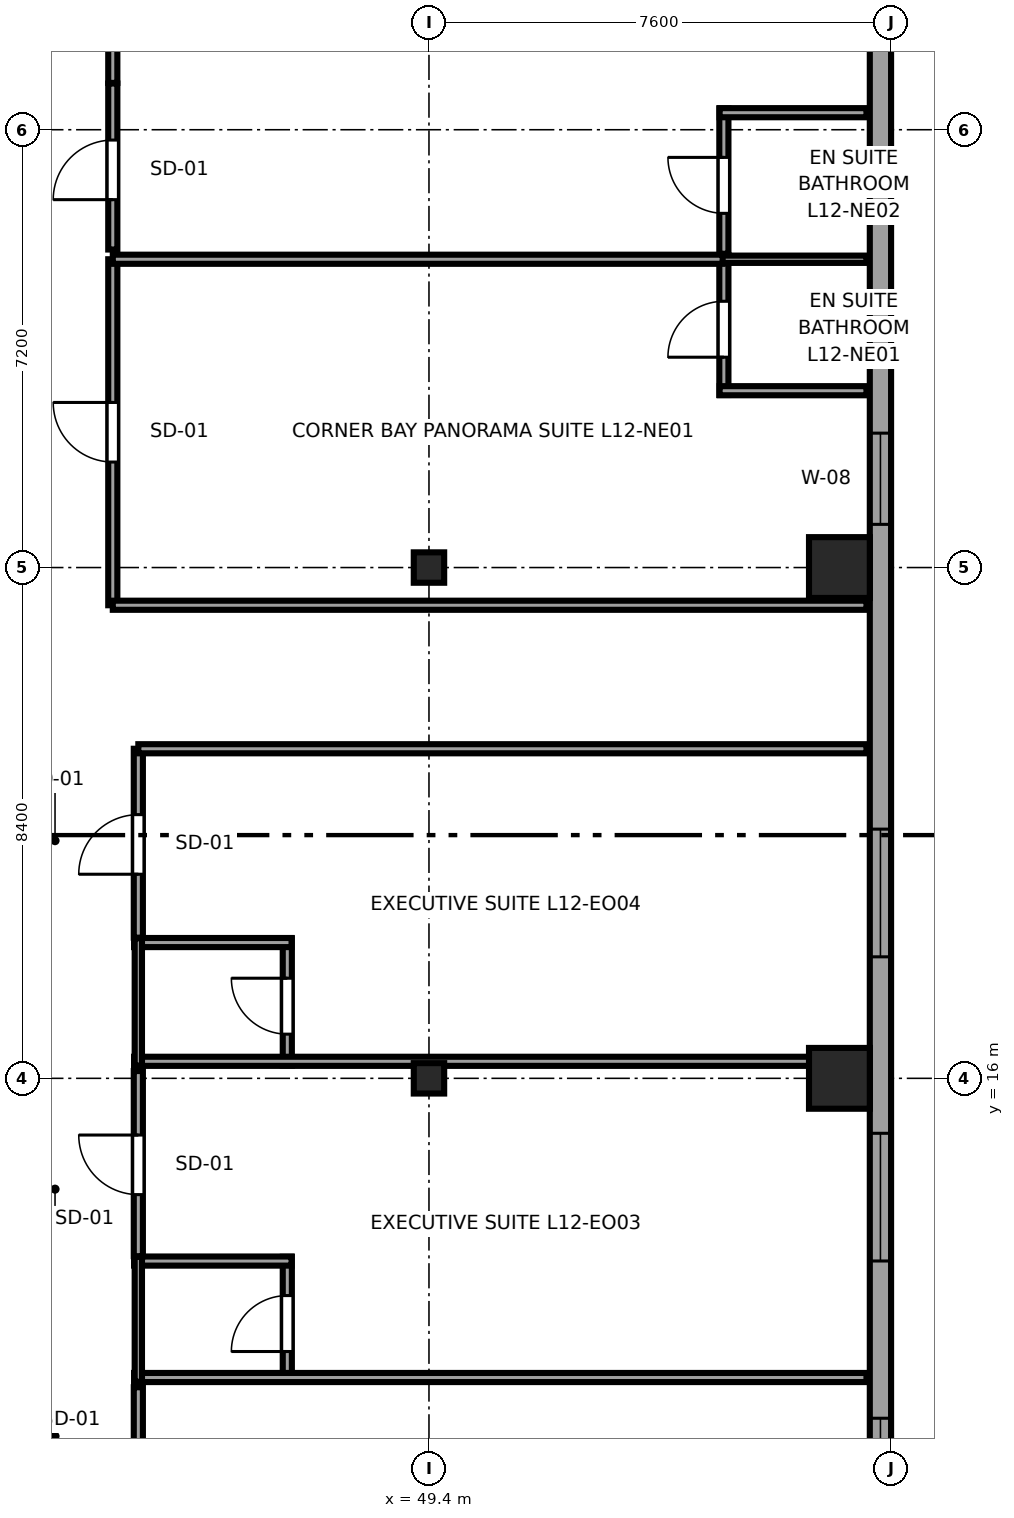
"""IFC4 building model, lengths in metres.
Left out: names, types, materials, properties, quantities, classifications, styles, units other than length and angle.
Written with IfcOpenShell. Run it as: python <this file> out.ifc"""

import sys

from ifc_helpers import new_model, si_unit, direction, frame, frame_2d, origin, origin_2d, place, context, subcontext, project, spatial, rectangle, i_section, extrude, source, transform, mapped, element, fill, save


model = new_model("IFC4")
c1 = context("Model", 3, precision=1e-05, world=origin(), true_north=direction((0.0, 1.0)))
c2 = subcontext(c1, "Body", "Model", "MODEL_VIEW")
j1 = project(units=[si_unit("LENGTHUNIT", "METRE"), si_unit("PLANEANGLEUNIT", "RADIAN")], contexts=[c1])
p1 = place(None, origin())
s1 = spatial("IfcSite", under=j1, at=p1, CompositionType="ELEMENT")
p2 = place(p1, origin())
s2 = spatial("IfcBuilding", under=s1, at=p2, CompositionType="ELEMENT")
p3 = place(p2, frame((0.0, 0.0, 53.3)))
s3 = spatial("IfcBuildingStorey", under=s2, at=p3, CompositionType="ELEMENT", Elevation=53.3)
m1 = source(origin(), c2, "Body", "SweptSolid", [
    extrude(i_section(OverallWidth=0.5, OverallDepth=0.5, WebThickness=0.028, FlangeThickness=0.045, at=origin_2d()), origin(), (0.0, 0.0, 1.0), 3.55),
])
for number, where, z_axis, x_axis in (
    (1, (49.4, 16.0, 0.0), (0.0, 0.0, 1.0), (1.0, 0.0, 0.0)),
    (2, (49.4, 24.4, 0.0), (0.0, 0.0, 1.0), (1.0, 0.0, 0.0)),
):
    element("IfcColumn", number, at=place(p3, frame(where, z_axis=z_axis, x_axis=x_axis)), inside=s3, PredefinedType="COLUMN", context=c2, shape_type="MappedRepresentation", body=[
        mapped(m1, transform((0.0, 0.0, 0.0), x_axis=(1.0, 0.0, 0.0), y_axis=(0.0, 1.0, 0.0), z_axis=(0.0, 0.0, 1.0), scale=1.0)),
    ])
m2 = source(origin(), c2, "Body", "SweptSolid", [
    extrude(rectangle(XDim=1.0, YDim=1.0, at=origin_2d()), origin(), (0.0, 0.0, 1.0), 3.55),
])
for number, where, z_axis, x_axis in (
    (3, (56.15, 16.0, 0.0), (0.0, 0.0, 1.0), (1.0, 0.0, 0.0)),
    (4, (56.15, 24.4, 0.0), (0.0, 0.0, 1.0), (1.0, 0.0, 0.0)),
):
    element("IfcColumn", number, at=place(p3, frame(where, z_axis=z_axis, x_axis=x_axis)), inside=s3, PredefinedType="COLUMN", context=c2, shape_type="MappedRepresentation", body=[
        mapped(m2, transform((0.0, 0.0, 0.0), x_axis=(1.0, 0.0, 0.0), y_axis=(0.0, 1.0, 0.0), z_axis=(0.0, 0.0, 1.0), scale=1.0)),
    ])
p4 = place(p3, frame((56.825, 4.617, 0.0), z_axis=(0.0, 0.0, 1.0), x_axis=(0.0, 1.0, 0.0)))
e5 = element("IfcWall", 5, at=p4, inside=s3, PredefinedType="SOLIDWALL", context=c2, shape_type="SweptSolid", body=[
    extrude(rectangle(XDim=36.766, YDim=0.35, at=frame_2d((18.383, 0.0))), origin(), (0.0, 0.0, 1.0), 3.37),
])
p5 = place(p4, frame((8.379, 0.0, 0.68)))
e6 = element("IfcOpeningElement", 6, at=p5, cuts=e5, PredefinedType="OPENING", context=c2, shape_type="SweptSolid", body=[
    extrude(rectangle(XDim=2.1, YDim=1.9, at=frame_2d((1.05, 0.95))), frame((0.0, 0.185, 0.0), z_axis=(0.0, -1.0, 0.0), x_axis=(1.0, 0.0, 0.0)), (0.0, 0.0, 1.0), 0.37),
])
p6 = place(p4, frame((13.381, 0.0, 0.68)))
e7 = element("IfcOpeningElement", 7, at=p6, cuts=e5, PredefinedType="OPENING", context=c2, shape_type="SweptSolid", body=[
    extrude(rectangle(XDim=2.1, YDim=1.9, at=frame_2d((1.05, 0.95))), frame((0.0, 0.185, 0.0), z_axis=(0.0, -1.0, 0.0), x_axis=(1.0, 0.0, 0.0)), (0.0, 0.0, 1.0), 0.37),
])
p7 = place(p4, frame((30.238, 0.0, 0.68)))
e8 = element("IfcOpeningElement", 8, at=p7, cuts=e5, PredefinedType="OPENING", context=c2, shape_type="SweptSolid", body=[
    extrude(rectangle(XDim=2.1, YDim=1.9, at=frame_2d((1.05, 0.95))), frame((0.0, 0.185, 0.0), z_axis=(0.0, -1.0, 0.0), x_axis=(1.0, 0.0, 0.0)), (0.0, 0.0, 1.0), 0.37),
])
p8 = place(p4, frame((33.14, 0.0, 0.68)))
e9 = element("IfcOpeningElement", 9, at=p8, cuts=e5, PredefinedType="OPENING", context=c2, shape_type="SweptSolid", body=[
    extrude(rectangle(XDim=2.1, YDim=1.9, at=frame_2d((1.05, 0.95))), frame((0.0, 0.185, 0.0), z_axis=(0.0, -1.0, 0.0), x_axis=(1.0, 0.0, 0.0)), (0.0, 0.0, 1.0), 0.37),
])
p9 = place(p4, frame((4.293, 0.0, 0.62)))
e10 = element("IfcOpeningElement", 10, at=p9, cuts=e5, PredefinedType="OPENING", context=c2, shape_type="SweptSolid", body=[
    extrude(rectangle(XDim=1.5, YDim=1.55, at=frame_2d((0.75, 0.775))), frame((0.0, 0.185, 0.0), z_axis=(0.0, -1.0, 0.0), x_axis=(1.0, 0.0, 0.0)), (0.0, 0.0, 1.0), 0.37),
])
p10 = place(p4, frame((20.493, 0.0, 0.62)))
e11 = element("IfcOpeningElement", 11, at=p10, cuts=e5, PredefinedType="OPENING", context=c2, shape_type="SweptSolid", body=[
    extrude(rectangle(XDim=1.5, YDim=1.55, at=frame_2d((0.75, 0.775))), frame((0.0, 0.185, 0.0), z_axis=(0.0, -1.0, 0.0), x_axis=(1.0, 0.0, 0.0)), (0.0, 0.0, 1.0), 0.37),
])
p11 = place(p3, frame((47.07, 11.01, 0.0), z_axis=(0.0, 0.0, 1.0), x_axis=(0.0, 1.0, 0.0)))
e12 = element("IfcWall", 12, at=p11, inside=s3, PredefinedType="PARTITIONING", context=c2, shape_type="SweptSolid", body=[
    extrude(rectangle(XDim=2.055, YDim=0.15, at=frame_2d((1.027, 0.0))), origin(), (0.0, 0.0, 1.0), 3.37),
])
p12 = place(p11, frame((0.498, 0.0, 0.0)))
e13 = element("IfcOpeningElement", 13, at=p12, cuts=e12, PredefinedType="OPENING", context=c2, shape_type="SweptSolid", body=[
    extrude(rectangle(XDim=0.92, YDim=2.01, at=frame_2d((0.46, 1.005))), frame((0.0, 0.085, 0.0), z_axis=(0.0, -1.0, 0.0), x_axis=(1.0, 0.0, 0.0)), (0.0, 0.0, 1.0), 0.17),
])
p13 = place(p3, frame((44.55, 11.08, 0.0), z_axis=(0.0, 0.0, 1.0), x_axis=(1.0, 0.0, 0.0)))
e14 = element("IfcWall", 14, at=p13, inside=s3, PredefinedType="PARTITIONING", context=c2, shape_type="SweptSolid", body=[
    extrude(rectangle(XDim=12.045, YDim=0.15, at=frame_2d((6.022, 0.0))), origin(), (0.0, 0.0, 1.0), 3.37),
])
p14 = place(p3, frame((44.55, 12.995, 0.0), z_axis=(0.0, 0.0, 1.0), x_axis=(1.0, 0.0, 0.0)))
e15 = element("IfcWall", 15, at=p14, inside=s3, PredefinedType="PARTITIONING", context=c2, shape_type="SweptSolid", body=[
    extrude(rectangle(XDim=2.59, YDim=0.15, at=frame_2d((1.295, 0.0))), origin(), (0.0, 0.0, 1.0), 3.37),
])
p15 = place(p3, frame((44.62, 11.01, 0.0), z_axis=(0.0, 0.0, 1.0), x_axis=(0.0, 1.0, 0.0)))
e16 = element("IfcWall", 16, at=p15, inside=s3, PredefinedType="PLUMBINGWALL", context=c2, shape_type="SweptSolid", body=[
    extrude(rectangle(XDim=2.055, YDim=0.12, at=frame_2d((1.027, 0.0))), origin(), (0.0, 0.0, 1.0), 3.37),
])
p16 = place(p3, frame((47.07, 16.21, 0.0), z_axis=(0.0, 0.0, 1.0), x_axis=(0.0, 1.0, 0.0)))
e17 = element("IfcWall", 17, at=p16, inside=s3, PredefinedType="PARTITIONING", context=c2, shape_type="SweptSolid", body=[
    extrude(rectangle(XDim=2.093, YDim=0.15, at=frame_2d((1.046, 0.0))), origin(), (0.0, 0.0, 1.0), 3.37),
])
p17 = place(p16, frame((0.517, 0.0, 0.0)))
e18 = element("IfcOpeningElement", 18, at=p17, cuts=e17, PredefinedType="OPENING", context=c2, shape_type="SweptSolid", body=[
    extrude(rectangle(XDim=0.92, YDim=2.01, at=frame_2d((0.46, 1.005))), frame((0.0, 0.085, 0.0), z_axis=(0.0, -1.0, 0.0), x_axis=(1.0, 0.0, 0.0)), (0.0, 0.0, 1.0), 0.17),
])
p18 = place(p3, frame((44.55, 16.28, 0.0), z_axis=(0.0, 0.0, 1.0), x_axis=(1.0, 0.0, 0.0)))
e19 = element("IfcWall", 19, at=p18, inside=s3, PredefinedType="PARTITIONING", context=c2, shape_type="SweptSolid", body=[
    extrude(rectangle(XDim=12.045, YDim=0.15, at=frame_2d((6.022, 0.0))), origin(), (0.0, 0.0, 1.0), 3.37),
])
p19 = place(p3, frame((44.55, 18.233, 0.0), z_axis=(0.0, 0.0, 1.0), x_axis=(1.0, 0.0, 0.0)))
e20 = element("IfcWall", 20, at=p19, inside=s3, PredefinedType="PARTITIONING", context=c2, shape_type="SweptSolid", body=[
    extrude(rectangle(XDim=2.59, YDim=0.15, at=frame_2d((1.295, 0.0))), origin(), (0.0, 0.0, 1.0), 3.37),
])
p20 = place(p3, frame((44.62, 16.21, 0.0), z_axis=(0.0, 0.0, 1.0), x_axis=(0.0, 1.0, 0.0)))
e21 = element("IfcWall", 21, at=p20, inside=s3, PredefinedType="PLUMBINGWALL", context=c2, shape_type="SweptSolid", body=[
    extrude(rectangle(XDim=2.093, YDim=0.12, at=frame_2d((1.046, 0.0))), origin(), (0.0, 0.0, 1.0), 3.37),
])
p21 = place(p3, frame((54.25, 27.238, 0.0), z_axis=(0.0, 0.0, 1.0), x_axis=(0.0, 1.0, 0.0)))
e22 = element("IfcWall", 22, at=p21, inside=s3, PredefinedType="PARTITIONING", context=c2, shape_type="SweptSolid", body=[
    extrude(rectangle(XDim=2.302, YDim=0.15, at=frame_2d((1.151, 0.0))), origin(), (0.0, 0.0, 1.0), 3.37),
])
p22 = place(p21, frame((0.621, 0.0, 0.0)))
e23 = element("IfcOpeningElement", 23, at=p22, cuts=e22, PredefinedType="OPENING", context=c2, shape_type="SweptSolid", body=[
    extrude(rectangle(XDim=0.92, YDim=2.01, at=frame_2d((0.46, 1.005))), frame((0.0, 0.085, 0.0), z_axis=(0.0, -1.0, 0.0), x_axis=(1.0, 0.0, 0.0)), (0.0, 0.0, 1.0), 0.17),
])
p23 = place(p3, frame((54.18, 27.308, 0.0), z_axis=(0.0, 0.0, 1.0), x_axis=(1.0, 0.0, 0.0)))
e24 = element("IfcWall", 24, at=p23, inside=s3, PredefinedType="PARTITIONING", context=c2, shape_type="SweptSolid", body=[
    extrude(rectangle(XDim=2.415, YDim=0.15, at=frame_2d((1.208, 0.0))), origin(), (0.0, 0.0, 1.0), 3.37),
])
p24 = place(p3, frame((54.18, 29.47, 0.0), z_axis=(0.0, 0.0, 1.0), x_axis=(1.0, 0.0, 0.0)))
e25 = element("IfcWall", 25, at=p24, inside=s3, PredefinedType="PLUMBINGWALL", context=c2, shape_type="SweptSolid", body=[
    extrude(rectangle(XDim=2.415, YDim=0.12, at=frame_2d((1.208, 0.0))), origin(), (0.0, 0.0, 1.0), 3.37),
])
p25 = place(p3, frame((54.25, 29.56, 0.0), z_axis=(0.0, 0.0, 1.0), x_axis=(0.0, 1.0, 0.0)))
e26 = element("IfcWall", 26, at=p25, inside=s3, PredefinedType="PARTITIONING", context=c2, shape_type="SweptSolid", body=[
    extrude(rectangle(XDim=2.39, YDim=0.15, at=frame_2d((1.195, 0.0))), origin(), (0.0, 0.0, 1.0), 3.37),
])
p26 = place(p25, frame((0.665, 0.0, 0.0)))
e27 = element("IfcOpeningElement", 27, at=p26, cuts=e26, PredefinedType="OPENING", context=c2, shape_type="SweptSolid", body=[
    extrude(rectangle(XDim=0.92, YDim=2.01, at=frame_2d((0.46, 1.005))), frame((0.0, 0.085, 0.0), z_axis=(0.0, -1.0, 0.0), x_axis=(1.0, 0.0, 0.0)), (0.0, 0.0, 1.0), 0.17),
])
p27 = place(p3, frame((54.18, 31.88, 0.0), z_axis=(0.0, 0.0, 1.0), x_axis=(1.0, 0.0, 0.0)))
e28 = element("IfcWall", 28, at=p27, inside=s3, PredefinedType="PARTITIONING", context=c2, shape_type="SweptSolid", body=[
    extrude(rectangle(XDim=2.415, YDim=0.15, at=frame_2d((1.208, 0.0))), origin(), (0.0, 0.0, 1.0), 3.37),
])
p28 = place(p3, frame((44.62, 7.751, 0.0), z_axis=(0.0, 0.0, 1.0), x_axis=(0.0, 1.0, 0.0)))
e29 = element("IfcWall", 29, at=p28, inside=s3, PredefinedType="PARTITIONING", context=c2, shape_type="SweptSolid", body=[
    extrude(rectangle(XDim=3.169, YDim=0.15, at=frame_2d((1.584, 0.0))), origin(), (0.0, 0.0, 1.0), 3.37),
])
p29 = place(p28, frame((1.074, 0.0, 0.0)))
e30 = element("IfcOpeningElement", 30, at=p29, cuts=e29, PredefinedType="OPENING", context=c2, shape_type="SweptSolid", body=[
    extrude(rectangle(XDim=0.98, YDim=2.12, at=frame_2d((0.49, 1.06))), frame((0.0, 0.085, 0.0), z_axis=(0.0, -1.0, 0.0), x_axis=(1.0, 0.0, 0.0)), (0.0, 0.0, 1.0), 0.17),
])
p30 = place(p3, frame((44.62, 13.075, 0.0), z_axis=(0.0, 0.0, 1.0), x_axis=(0.0, 1.0, 0.0)))
e31 = element("IfcWall", 31, at=p30, inside=s3, PredefinedType="PARTITIONING", context=c2, shape_type="SweptSolid", body=[
    extrude(rectangle(XDim=3.045, YDim=0.15, at=frame_2d((1.522, 0.0))), origin(), (0.0, 0.0, 1.0), 3.37),
])
p31 = place(p30, frame((1.012, 0.0, 0.0)))
e32 = element("IfcOpeningElement", 32, at=p31, cuts=e31, PredefinedType="OPENING", context=c2, shape_type="SweptSolid", body=[
    extrude(rectangle(XDim=0.98, YDim=2.12, at=frame_2d((0.49, 1.06))), frame((0.0, 0.085, 0.0), z_axis=(0.0, -1.0, 0.0), x_axis=(1.0, 0.0, 0.0)), (0.0, 0.0, 1.0), 0.17),
])
p32 = place(p3, frame((44.62, 18.313, 0.0), z_axis=(0.0, 0.0, 1.0), x_axis=(0.0, 1.0, 0.0)))
e33 = element("IfcWall", 33, at=p32, inside=s3, PredefinedType="PARTITIONING", context=c2, shape_type="SweptSolid", body=[
    extrude(rectangle(XDim=3.107, YDim=0.15, at=frame_2d((1.553, 0.0))), origin(), (0.0, 0.0, 1.0), 3.37),
])
p33 = place(p32, frame((1.043, 0.0, 0.0)))
e34 = element("IfcOpeningElement", 34, at=p33, cuts=e33, PredefinedType="OPENING", context=c2, shape_type="SweptSolid", body=[
    extrude(rectangle(XDim=0.98, YDim=2.12, at=frame_2d((0.49, 1.06))), frame((0.0, 0.085, 0.0), z_axis=(0.0, -1.0, 0.0), x_axis=(1.0, 0.0, 0.0)), (0.0, 0.0, 1.0), 0.17),
])
p34 = place(p3, frame((44.62, 21.42, 0.0), z_axis=(0.0, 0.0, 1.0), x_axis=(1.0, 0.0, 0.0)))
e35 = element("IfcWall", 35, at=p34, inside=s3, PredefinedType="PARTITIONING", context=c2, shape_type="SweptSolid", body=[
    extrude(rectangle(XDim=11.975, YDim=0.15, at=frame_2d((5.987, 0.0))), origin(), (0.0, 0.0, 1.0), 3.37),
])
p35 = place(p3, frame((44.2, 23.78, 0.0), z_axis=(0.0, 0.0, 1.0), x_axis=(0.0, 1.0, 0.0)))
e36 = element("IfcWall", 36, at=p35, inside=s3, PredefinedType="PARTITIONING", context=c2, shape_type="SweptSolid", body=[
    extrude(rectangle(XDim=5.69, YDim=0.15, at=frame_2d((2.845, 0.0))), origin(), (0.0, 0.0, 1.0), 3.37),
])
p36 = place(p35, frame((2.355, 0.0, 0.0)))
e37 = element("IfcOpeningElement", 37, at=p36, cuts=e36, PredefinedType="OPENING", context=c2, shape_type="SweptSolid", body=[
    extrude(rectangle(XDim=0.98, YDim=2.12, at=frame_2d((0.49, 1.06))), frame((0.0, 0.085, 0.0), z_axis=(0.0, -1.0, 0.0), x_axis=(1.0, 0.0, 0.0)), (0.0, 0.0, 1.0), 0.17),
])
p37 = place(p3, frame((44.2, 23.78, 0.0), z_axis=(0.0, 0.0, 1.0), x_axis=(1.0, 0.0, 0.0)))
e38 = element("IfcWall", 38, at=p37, inside=s3, PredefinedType="PARTITIONING", context=c2, shape_type="SweptSolid", body=[
    extrude(rectangle(XDim=12.395, YDim=0.15, at=frame_2d((6.198, 0.0))), origin(), (0.0, 0.0, 1.0), 3.37),
])
p38 = place(p3, frame((44.2, 29.47, 0.0), z_axis=(0.0, 0.0, 1.0), x_axis=(1.0, 0.0, 0.0)))
e39 = element("IfcWall", 39, at=p38, inside=s3, PredefinedType="PARTITIONING", context=c2, shape_type="SweptSolid", body=[
    extrude(rectangle(XDim=10.03, YDim=0.15, at=frame_2d((5.015, 0.0))), origin(), (0.0, 0.0, 1.0), 3.37),
])
p39 = place(p3, frame((44.2, 29.63, 0.0), z_axis=(0.0, 0.0, 1.0), x_axis=(0.0, 1.0, 0.0)))
e40 = element("IfcWall", 40, at=p39, inside=s3, PredefinedType="PARTITIONING", context=c2, shape_type="SweptSolid", body=[
    extrude(rectangle(XDim=2.73, YDim=0.15, at=frame_2d((1.365, 0.0))), origin(), (0.0, 0.0, 1.0), 3.37),
])
p40 = place(p39, frame((0.82, 0.0, 0.0)))
e41 = element("IfcOpeningElement", 41, at=p40, cuts=e40, PredefinedType="OPENING", context=c2, shape_type="SweptSolid", body=[
    extrude(rectangle(XDim=0.98, YDim=2.12, at=frame_2d((0.49, 1.06))), frame((0.0, 0.085, 0.0), z_axis=(0.0, -1.0, 0.0), x_axis=(1.0, 0.0, 0.0)), (0.0, 0.0, 1.0), 0.17),
])
p41 = place(p3, frame((44.2, 32.37, 0.0), z_axis=(0.0, 0.0, 1.0), x_axis=(0.0, 1.0, 0.0)))
e42 = element("IfcWall", 42, at=p41, inside=s3, PredefinedType="PARTITIONING", context=c2, shape_type="SweptSolid", body=[
    extrude(rectangle(XDim=13.225, YDim=0.15, at=frame_2d((6.612, 0.0))), origin(), (0.0, 0.0, 1.0), 3.37),
])
m3 = source(origin(), c2, "Body", "SweptSolid", [
    extrude(rectangle(XDim=2.1, YDim=1.9, at=frame_2d((1.05, 0.95))), frame((0.0, 0.09, 0.0), z_axis=(0.0, -1.0, 0.0), x_axis=(1.0, 0.0, 0.0)), (0.0, 0.0, 1.0), 0.06),
])
p42 = place(p5, origin())
e43 = element("IfcWindow", 43, at=p42, inside=s3, PartitioningType="TRIPLE_PANEL_HORIZONTAL", PredefinedType="WINDOW", context=c2, shape_type="MappedRepresentation", body=[
    mapped(m3, transform((0.0, 0.0, 0.0), x_axis=(1.0, 0.0, 0.0), y_axis=(0.0, 1.0, 0.0), z_axis=(0.0, 0.0, 1.0), scale=1.0)),
])
fill(e6, e43)
p43 = place(p6, origin())
e44 = element("IfcWindow", 44, at=p43, inside=s3, PartitioningType="TRIPLE_PANEL_HORIZONTAL", PredefinedType="WINDOW", context=c2, shape_type="MappedRepresentation", body=[
    mapped(m3, transform((0.0, 0.0, 0.0), x_axis=(1.0, 0.0, 0.0), y_axis=(0.0, 1.0, 0.0), z_axis=(0.0, 0.0, 1.0), scale=1.0)),
])
fill(e7, e44)
m4 = source(origin(), c2, "Body", "SweptSolid", [
    extrude(rectangle(XDim=1.5, YDim=1.55, at=frame_2d((0.75, 0.775))), frame((0.0, 0.09, 0.0), z_axis=(0.0, -1.0, 0.0), x_axis=(1.0, 0.0, 0.0)), (0.0, 0.0, 1.0), 0.06),
])
p44 = place(p9, origin())
e45 = element("IfcWindow", 45, at=p44, inside=s3, PartitioningType="SINGLE_PANEL", PredefinedType="WINDOW", context=c2, shape_type="MappedRepresentation", body=[
    mapped(m4, transform((0.0, 0.0, 0.0), x_axis=(1.0, 0.0, 0.0), y_axis=(0.0, 1.0, 0.0), z_axis=(0.0, 0.0, 1.0), scale=1.0)),
])
fill(e10, e45)
p45 = place(p10, origin())
e46 = element("IfcWindow", 46, at=p45, inside=s3, PartitioningType="SINGLE_PANEL", PredefinedType="WINDOW", context=c2, shape_type="MappedRepresentation", body=[
    mapped(m4, transform((0.0, 0.0, 0.0), x_axis=(1.0, 0.0, 0.0), y_axis=(0.0, 1.0, 0.0), z_axis=(0.0, 0.0, 1.0), scale=1.0)),
])
fill(e11, e46)
m5 = source(origin(), c2, "Body", "SweptSolid", [
    extrude(rectangle(XDim=0.92, YDim=2.01, at=frame_2d((0.46, 1.005))), frame((0.0, 0.025, 0.0), z_axis=(0.0, -1.0, 0.0), x_axis=(1.0, 0.0, 0.0)), (0.0, 0.0, 1.0), 0.05),
])
p46 = place(p12, origin())
e47 = element("IfcDoor", 47, at=p46, inside=s3, OperationType="SINGLE_SWING_LEFT", PredefinedType="DOOR", context=c2, shape_type="MappedRepresentation", body=[
    mapped(m5, transform((0.0, 0.0, 0.0), x_axis=(1.0, 0.0, 0.0), y_axis=(0.0, 1.0, 0.0), z_axis=(0.0, 0.0, 1.0), scale=1.0)),
])
fill(e13, e47)
p47 = place(p17, origin())
e48 = element("IfcDoor", 48, at=p47, inside=s3, OperationType="SINGLE_SWING_RIGHT", PredefinedType="DOOR", context=c2, shape_type="MappedRepresentation", body=[
    mapped(m5, transform((0.0, 0.0, 0.0), x_axis=(1.0, 0.0, 0.0), y_axis=(0.0, 1.0, 0.0), z_axis=(0.0, 0.0, 1.0), scale=1.0)),
])
fill(e18, e48)
p48 = place(p22, origin())
e49 = element("IfcDoor", 49, at=p48, inside=s3, OperationType="SINGLE_SWING_LEFT", PredefinedType="DOOR", context=c2, shape_type="MappedRepresentation", body=[
    mapped(m5, transform((0.0, 0.0, 0.0), x_axis=(1.0, 0.0, 0.0), y_axis=(0.0, 1.0, 0.0), z_axis=(0.0, 0.0, 1.0), scale=1.0)),
])
fill(e23, e49)
p49 = place(p26, origin())
e50 = element("IfcDoor", 50, at=p49, inside=s3, OperationType="SINGLE_SWING_RIGHT", PredefinedType="DOOR", context=c2, shape_type="MappedRepresentation", body=[
    mapped(m5, transform((0.0, 0.0, 0.0), x_axis=(1.0, 0.0, 0.0), y_axis=(0.0, 1.0, 0.0), z_axis=(0.0, 0.0, 1.0), scale=1.0)),
])
fill(e27, e50)
m6 = source(origin(), c2, "Body", "SweptSolid", [
    extrude(rectangle(XDim=0.98, YDim=2.12, at=frame_2d((0.49, 1.06))), frame((0.0, 0.025, 0.0), z_axis=(0.0, -1.0, 0.0), x_axis=(1.0, 0.0, 0.0)), (0.0, 0.0, 1.0), 0.05),
])
p50 = place(p31, origin())
e51 = element("IfcDoor", 51, at=p50, inside=s3, OperationType="SINGLE_SWING_RIGHT", PredefinedType="DOOR", context=c2, shape_type="MappedRepresentation", body=[
    mapped(m6, transform((0.0, 0.0, 0.0), x_axis=(1.0, 0.0, 0.0), y_axis=(0.0, 1.0, 0.0), z_axis=(0.0, 0.0, 1.0), scale=1.0)),
])
fill(e32, e51)
p51 = place(p33, origin())
e52 = element("IfcDoor", 52, at=p51, inside=s3, OperationType="SINGLE_SWING_LEFT", PredefinedType="DOOR", context=c2, shape_type="MappedRepresentation", body=[
    mapped(m6, transform((0.0, 0.0, 0.0), x_axis=(1.0, 0.0, 0.0), y_axis=(0.0, 1.0, 0.0), z_axis=(0.0, 0.0, 1.0), scale=1.0)),
])
fill(e34, e52)
p52 = place(p36, origin())
e53 = element("IfcDoor", 53, at=p52, inside=s3, OperationType="SINGLE_SWING_RIGHT", PredefinedType="DOOR", context=c2, shape_type="MappedRepresentation", body=[
    mapped(m6, transform((0.0, 0.0, 0.0), x_axis=(1.0, 0.0, 0.0), y_axis=(0.0, 1.0, 0.0), z_axis=(0.0, 0.0, 1.0), scale=1.0)),
])
fill(e37, e53)
p53 = place(p40, origin())
e54 = element("IfcDoor", 54, at=p53, inside=s3, OperationType="SINGLE_SWING_LEFT", PredefinedType="DOOR", context=c2, shape_type="MappedRepresentation", body=[
    mapped(m6, transform((0.0, 0.0, 0.0), x_axis=(1.0, 0.0, 0.0), y_axis=(0.0, 1.0, 0.0), z_axis=(0.0, 0.0, 1.0), scale=1.0)),
])
fill(e41, e54)
save(model, sys.argv[1])
